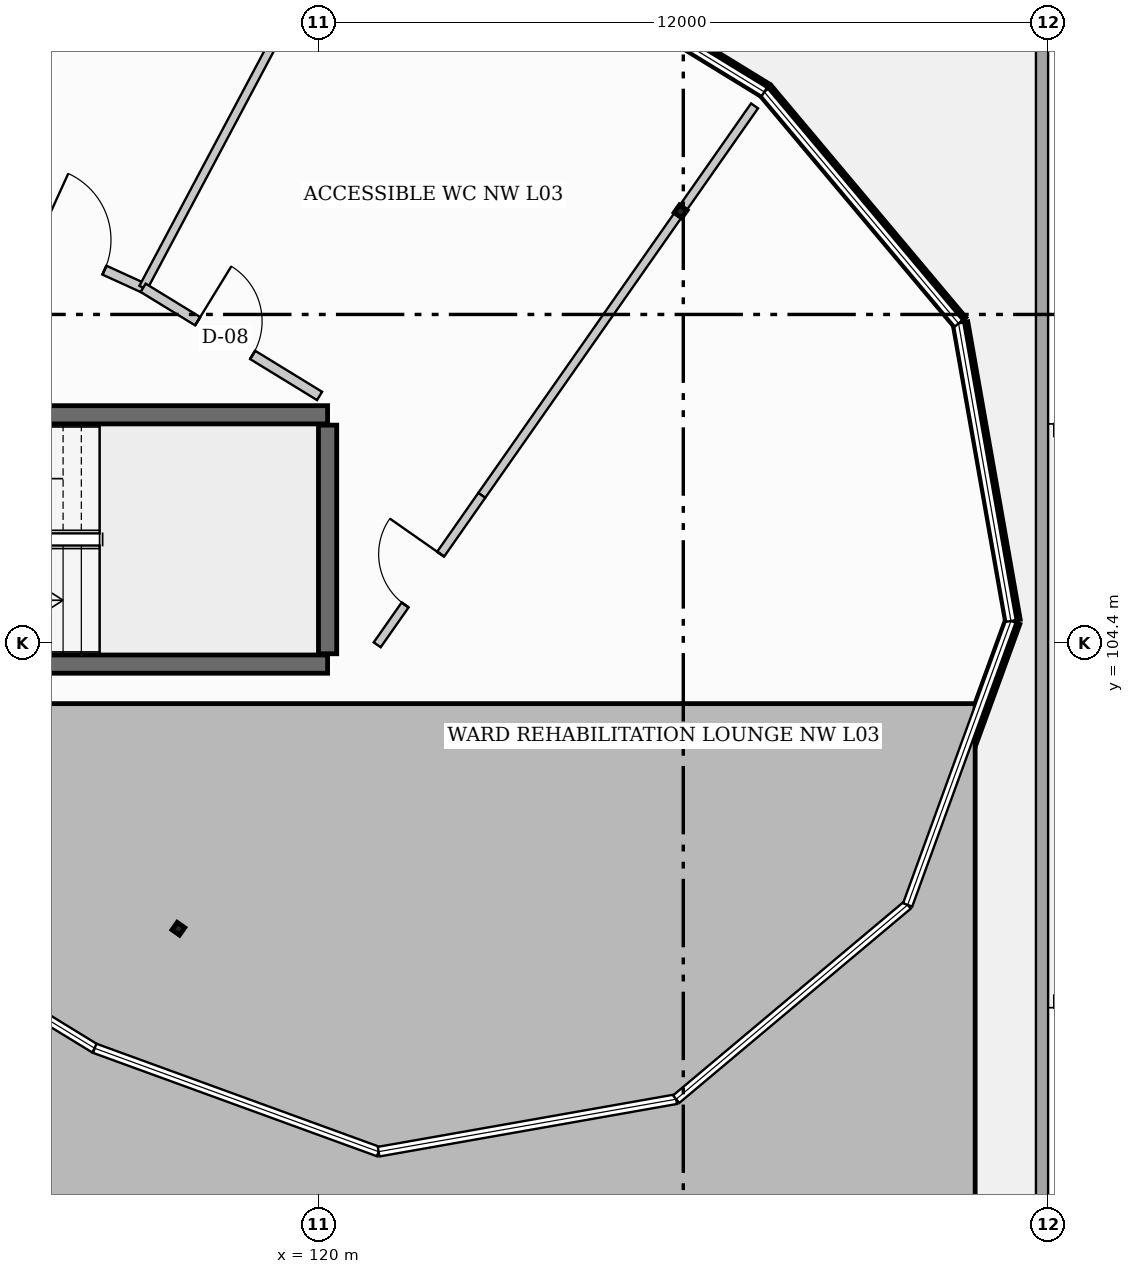
"""IFC4 building model, lengths in metres.
Left out: names, types, materials, properties, quantities, classifications, styles, units other than length and angle.
Written with IfcOpenShell. Run it as: python <this file> out.ifc"""

import sys

from ifc_helpers import new_model, si_unit, direction, frame, frame_2d, origin, origin_2d, place, context, subcontext, project, spatial, rectangle, hollow_rectangle, i_section, extrude, element, fill, save


model = new_model("IFC4")
c1 = context("Model", 3, precision=1e-05, world=origin(), true_north=direction((0.0, 1.0)))
c2 = subcontext(c1, "Body", "Model", "MODEL_VIEW")
j1 = project(units=[si_unit("LENGTHUNIT", "METRE"), si_unit("PLANEANGLEUNIT", "RADIAN")], contexts=[c1])
p1 = place(None, origin())
s1 = spatial("IfcSite", under=j1, at=p1, CompositionType="ELEMENT")
p2 = place(p1, origin())
s2 = spatial("IfcBuilding", under=s1, at=p2, CompositionType="ELEMENT")
p3 = place(p2, frame((0.0, 0.0, 14.4)))
s3 = spatial("IfcBuildingStorey", under=s2, at=p3, CompositionType="ELEMENT", Elevation=14.4)
p4 = place(p3, frame((125.956, 111.494, 0.0), z_axis=(0.0, 0.0, 1.0), x_axis=(0.573576436351, 0.819152044289, 0.0)))
e1 = element("IfcColumn", 1, at=p4, inside=s3, PredefinedType="COLUMN", context=c2, shape_type="SweptSolid", body=[
    extrude(i_section(OverallWidth=0.152, OverallDepth=0.152, WebThickness=0.006, FlangeThickness=0.007, at=origin_2d()), origin(), (0.0, 0.0, 1.0), 3.9),
])
p5 = place(p3, frame((117.696, 99.698, 0.0), z_axis=(0.0, 0.0, 1.0), x_axis=(0.573576436351, 0.819152044289, 0.0)))
e2 = element("IfcColumn", 2, at=p5, inside=s3, PredefinedType="COLUMN", context=c2, shape_type="SweptSolid", body=[
    extrude(hollow_rectangle(XDim=0.15, YDim=0.15, WallThickness=0.008, at=origin_2d()), origin(), (0.0, 0.0, 1.0), 3.9),
])
p6 = place(p3, frame((111.45, 104.05, 0.0), z_axis=(0.0, 0.0, 1.0), x_axis=(1.0, 0.0, 0.0)))
e3 = element("IfcWall", 3, at=p6, inside=s3, PredefinedType="SHEAR", context=c2, shape_type="SweptSolid", body=[
    extrude(rectangle(XDim=8.7, YDim=0.3, at=frame_2d((4.35, 0.0))), origin(), (0.0, 0.0, 1.0), 3.9),
])
p7 = place(p6, frame((0.35, 0.0, 0.0)))
e4 = element("IfcOpeningElement", 4, at=p7, cuts=e3, PredefinedType="OPENING", context=c2, shape_type="SweptSolid", body=[
    extrude(rectangle(XDim=1.1, YDim=2.15, at=frame_2d((0.55, 1.075))), frame((0.0, 0.16, 0.0), z_axis=(0.0, -1.0, 0.0), x_axis=(1.0, 0.0, 0.0)), (0.0, 0.0, 1.0), 0.32),
])
p8 = place(p3, frame((120.15, 108.15, 0.0), z_axis=(0.0, 0.0, 1.0), x_axis=(-1.0, 0.0, 0.0)))
e5 = element("IfcWall", 5, at=p8, inside=s3, PredefinedType="SHEAR", context=c2, shape_type="SweptSolid", body=[
    extrude(rectangle(XDim=8.7, YDim=0.3, at=frame_2d((4.35, 0.0))), origin(), (0.0, 0.0, 1.0), 3.9),
])
p9 = place(p3, frame((120.15, 104.22, 0.0), z_axis=(0.0, 0.0, 1.0), x_axis=(0.0, 1.0, 0.0)))
e6 = element("IfcWall", 6, at=p9, inside=s3, PredefinedType="SHEAR", context=c2, shape_type="SweptSolid", body=[
    extrude(rectangle(XDim=3.76, YDim=0.3, at=frame_2d((1.88, 0.0))), origin(), (0.0, 0.0, 1.0), 3.9),
])
p10 = place(p3, frame((116.32, 97.732, 0.0), z_axis=(0.0, 0.0, 1.0), x_axis=(-0.852628362135, 0.522517823698, 0.0)))
e7 = element("IfcWall", 7, at=p10, inside=s3, PredefinedType="STANDARD", context=c2, shape_type="SweptSolid", body=[
    extrude(rectangle(XDim=5.177, YDim=0.22, at=frame_2d((2.588, 0.0))), origin(), (0.0, 0.0, 1.0), 1.05),
])
p11 = place(p3, frame((120.989, 96.032, 0.0), z_axis=(0.0, 0.0, 1.0), x_axis=(-0.939654190044, 0.34212571247, 0.0)))
e8 = element("IfcWall", 8, at=p11, inside=s3, PredefinedType="STANDARD", context=c2, shape_type="SweptSolid", body=[
    extrude(rectangle(XDim=4.969, YDim=0.22, at=frame_2d((2.484, 0.0))), origin(), (0.0, 0.0, 1.0), 1.05),
])
p12 = place(p3, frame((125.883, 96.895, 0.0), z_axis=(0.0, 0.0, 1.0), x_axis=(-0.984804817938, -0.173664822479, 0.0)))
e9 = element("IfcWall", 9, at=p12, inside=s3, PredefinedType="STANDARD", context=c2, shape_type="SweptSolid", body=[
    extrude(rectangle(XDim=4.969, YDim=0.22, at=frame_2d((2.485, 0.0))), origin(), (0.0, 0.0, 1.0), 1.05),
])
p13 = place(p3, frame((129.69, 100.09, 0.0), z_axis=(0.0, 0.0, 1.0), x_axis=(-0.765973821879, -0.642871763415, 0.0)))
e10 = element("IfcWall", 10, at=p13, inside=s3, PredefinedType="STANDARD", context=c2, shape_type="SweptSolid", body=[
    extrude(rectangle(XDim=4.97, YDim=0.22, at=frame_2d((2.485, 0.0))), origin(), (0.0, 0.0, 1.0), 1.05),
])
p14 = place(p3, frame((131.389, 104.759, 0.0), z_axis=(0.0, 0.0, 1.0), x_axis=(-0.341952160632, -0.939717361678, 0.0)))
e11 = element("IfcWall", 11, at=p14, inside=s3, PredefinedType="STANDARD", context=c2, shape_type="SweptSolid", body=[
    extrude(rectangle(XDim=4.969, YDim=0.22, at=frame_2d((2.484, 0.0))), origin(), (0.0, 0.0, 1.0), 1.05),
])
p15 = place(p3, frame((130.527, 109.653, 0.0), z_axis=(0.0, 0.0, 1.0), x_axis=(0.173426579259, -0.984846801085, 0.0)))
e12 = element("IfcWall", 12, at=p15, inside=s3, PredefinedType="STANDARD", context=c2, shape_type="SweptSolid", body=[
    extrude(rectangle(XDim=4.969, YDim=0.22, at=frame_2d((2.485, 0.0))), origin(), (0.0, 0.0, 1.0), 1.05),
])
p16 = place(p3, frame((127.332, 113.46, 0.0), z_axis=(0.0, 0.0, 1.0), x_axis=(0.642871763415, -0.765973821879, 0.0)))
e13 = element("IfcWall", 13, at=p16, inside=s3, PredefinedType="STANDARD", context=c2, shape_type="SweptSolid", body=[
    extrude(rectangle(XDim=4.97, YDim=0.22, at=frame_2d((2.485, 0.0))), origin(), (0.0, 0.0, 1.0), 1.05),
])
p17 = place(p3, frame((120.919, 117.39, 0.0), z_axis=(0.0, 0.0, 1.0), x_axis=(0.852640903338, -0.522497358803, 0.0)))
e14 = element("IfcWall", 14, at=p17, inside=s3, PredefinedType="STANDARD", context=c2, shape_type="SweptSolid", body=[
    extrude(rectangle(XDim=7.521, YDim=0.22, at=frame_2d((3.761, 0.0))), origin(), (0.0, 0.0, 1.0), 1.05),
])
p18 = place(p3, frame((131.9, 125.9, 0.33), z_axis=(0.0, 0.0, 1.0), x_axis=(0.0, -1.0, 0.0)))
e15 = element("IfcWall", 15, at=p18, inside=s3, PredefinedType="PARAPET", context=c2, shape_type="SweptSolid", body=[
    extrude(rectangle(XDim=44.2, YDim=0.2, at=frame_2d((22.1, 0.0))), origin(), (0.0, 0.0, 1.0), 1.12),
])
p19 = place(p3, frame((111.173, 112.947, 0.0), z_axis=(0.0, 0.0, 1.0), x_axis=(0.909948737979, -0.414720742488, 0.0)))
e16 = element("IfcWall", 16, at=p19, inside=s3, PredefinedType="PARTITIONING", context=c2, shape_type="SweptSolid", body=[
    extrude(rectangle(XDim=6.532, YDim=0.16, at=frame_2d((3.266, 0.0))), origin(), (0.0, 0.0, 1.0), 3.088),
])
p20 = place(p19, frame((4.632, 0.0, 0.0)))
e17 = element("IfcOpeningElement", 17, at=p20, cuts=e16, PredefinedType="OPENING", context=c2, shape_type="SweptSolid", body=[
    extrude(rectangle(XDim=1.2, YDim=2.12, at=frame_2d((0.6, 1.06))), frame((0.0, 0.09, 0.0), z_axis=(0.0, -1.0, 0.0), x_axis=(1.0, 0.0, 0.0)), (0.0, 0.0, 1.0), 0.18),
])
p21 = place(p3, frame((117.117, 110.238, 0.0), z_axis=(0.0, 0.0, 1.0), x_axis=(0.469490767167, 0.88293738144, 0.0)))
e18 = element("IfcWall", 18, at=p21, inside=s3, PredefinedType="PARTITIONING", context=c2, shape_type="SweptSolid", body=[
    extrude(rectangle(XDim=7.819, YDim=0.14, at=frame_2d((3.91, 0.0))), origin(), (0.0, 0.0, 1.0), 3.091),
])
p22 = place(p3, frame((117.117, 110.238, 0.0), z_axis=(0.0, 0.0, 1.0), x_axis=(0.852605377196, -0.522555327957, 0.0)))
e19 = element("IfcWall", 19, at=p22, inside=s3, PredefinedType="PARTITIONING", context=c2, shape_type="SweptSolid", body=[
    extrude(rectangle(XDim=3.403, YDim=0.16, at=frame_2d((1.701, 0.0))), origin(), (0.0, 0.0, 1.0), 3.56),
])
p23 = place(p22, frame((1.051, 0.0, 0.0)))
e20 = element("IfcOpeningElement", 20, at=p23, cuts=e19, PredefinedType="OPENING", context=c2, shape_type="SweptSolid", body=[
    extrude(rectangle(XDim=1.06, YDim=2.1, at=frame_2d((0.53, 1.05))), frame((0.0, 0.09, 0.0), z_axis=(0.0, -1.0, 0.0), x_axis=(1.0, 0.0, 0.0)), (0.0, 0.0, 1.0), 0.18),
])
p24 = place(p3, frame((122.686, 106.825, 0.0), z_axis=(0.0, 0.0, 1.0), x_axis=(0.573682336084, 0.819077882295, 0.0)))
e21 = element("IfcWall", 21, at=p24, inside=s3, PredefinedType="PARTITIONING", context=c2, shape_type="SweptSolid", body=[
    extrude(rectangle(XDim=7.82, YDim=0.14, at=frame_2d((3.91, 0.0))), origin(), (0.0, 0.0, 1.0), 3.142),
])
p25 = place(p3, frame((120.966, 104.367, 0.0), z_axis=(0.0, 0.0, 1.0), x_axis=(0.573320330817, 0.819331311663, 0.0)))
e22 = element("IfcWall", 22, at=p25, inside=s3, PredefinedType="PARTITIONING", context=c2, shape_type="SweptSolid", body=[
    extrude(rectangle(XDim=3.0, YDim=0.14, at=frame_2d((1.5, 0.0))), origin(), (0.0, 0.0, 1.0), 3.56),
])
p26 = place(p25, frame((0.8, 0.0, 0.0)))
e23 = element("IfcOpeningElement", 23, at=p26, cuts=e22, PredefinedType="OPENING", context=c2, shape_type="SweptSolid", body=[
    extrude(rectangle(XDim=1.02, YDim=2.08, at=frame_2d((0.51, 1.04))), frame((0.0, 0.08, 0.0), z_axis=(0.0, -1.0, 0.0), x_axis=(1.0, 0.0, 0.0)), (0.0, 0.0, 1.0), 0.16),
])
p27 = place(p20, origin())
e24 = element("IfcDoor", 24, at=p27, inside=s3, OperationType="SINGLE_SWING_LEFT", PredefinedType="DOOR", context=c2, shape_type="SweptSolid", body=[
    extrude(rectangle(XDim=1.2, YDim=2.12, at=frame_2d((0.6, 1.06))), frame((0.0, 0.025, 0.0), z_axis=(0.0, -1.0, 0.0), x_axis=(1.0, 0.0, 0.0)), (0.0, 0.0, 1.0), 0.05),
])
fill(e17, e24)
p28 = place(p23, origin())
e25 = element("IfcDoor", 25, at=p28, inside=s3, OperationType="SINGLE_SWING_LEFT", PredefinedType="DOOR", context=c2, shape_type="SweptSolid", body=[
    extrude(rectangle(XDim=1.06, YDim=2.1, at=frame_2d((0.53, 1.05))), frame((0.0, 0.025, 0.0), z_axis=(0.0, -1.0, 0.0), x_axis=(1.0, 0.0, 0.0)), (0.0, 0.0, 1.0), 0.05),
])
fill(e20, e25)
p29 = place(p26, origin())
e26 = element("IfcDoor", 26, at=p29, inside=s3, OperationType="SINGLE_SWING_RIGHT", PredefinedType="DOOR", context=c2, shape_type="SweptSolid", body=[
    extrude(rectangle(XDim=1.02, YDim=2.08, at=frame_2d((0.51, 1.04))), frame((0.0, 0.025, 0.0), z_axis=(0.0, -1.0, 0.0), x_axis=(1.0, 0.0, 0.0)), (0.0, 0.0, 1.0), 0.05),
])
fill(e23, e26)
save(model, sys.argv[1])
